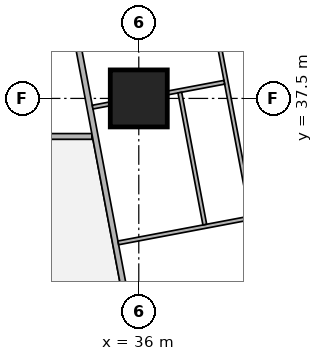
"""IFC4 building model, lengths in metres.
Left out: names, types, materials, properties, quantities, classifications, styles, units other than length and angle.
Written with IfcOpenShell. Run it as: python <this file> out.ifc"""

import sys

from ifc_helpers import new_model, si_unit, direction, frame, frame_2d, origin, origin_2d, place, context, subcontext, project, spatial, rectangle, extrude, element, fill, save


model = new_model("IFC4")
c1 = context("Model", 3, precision=1e-05, world=origin(), true_north=direction((0.0, 1.0)))
c2 = subcontext(c1, "Body", "Model", "MODEL_VIEW")
j1 = project(units=[si_unit("LENGTHUNIT", "METRE"), si_unit("PLANEANGLEUNIT", "RADIAN")], contexts=[c1])
p1 = place(None, origin())
s1 = spatial("IfcSite", under=j1, at=p1, CompositionType="ELEMENT")
p2 = place(p1, origin())
s2 = spatial("IfcBuilding", under=s1, at=p2, CompositionType="ELEMENT")
p3 = place(p2, frame((0.0, 0.0, 139.55)))
s3 = spatial("IfcBuildingStorey", under=s2, at=p3, CompositionType="ELEMENT", Elevation=139.55)
p4 = place(p3, frame((36.0, 37.5, 0.0), z_axis=(0.0, 0.0, 1.0), x_axis=(1.0, 0.0, 0.0)))
e1 = element("IfcColumn", 1, at=p4, inside=s3, PredefinedType="COLUMN", context=c2, shape_type="SweptSolid", body=[
    extrude(rectangle(XDim=1.5, YDim=1.5, at=origin_2d()), origin(), (0.0, 0.0, 1.0), 3.75),
])
p5 = place(p3, frame((8.35, 36.5, 0.0), z_axis=(0.0, 0.0, 1.0), x_axis=(1.0, 0.0, 0.0)))
e2 = element("IfcWall", 2, at=p5, inside=s3, PredefinedType="SOLIDWALL", context=c2, shape_type="SweptSolid", body=[
    extrude(rectangle(XDim=26.415, YDim=0.15, at=frame_2d((13.208, 0.0))), origin(), (0.0, 0.0, 1.0), 3.5),
])
p6 = place(p5, frame((2.6, 0.0, 0.0)))
e3 = element("IfcOpeningElement", 3, at=p6, cuts=e2, PredefinedType="OPENING", context=c2, shape_type="SweptSolid", body=[
    extrude(rectangle(XDim=1.0, YDim=2.1, at=frame_2d((0.5, 1.05))), frame((0.0, 0.085, 0.0), z_axis=(0.0, -1.0, 0.0), x_axis=(1.0, 0.0, 0.0)), (0.0, 0.0, 1.0), 0.17),
])
p7 = place(p5, frame((10.75, 0.0, 0.0)))
e4 = element("IfcOpeningElement", 4, at=p7, cuts=e2, PredefinedType="OPENING", context=c2, shape_type="SweptSolid", body=[
    extrude(rectangle(XDim=1.0, YDim=2.1, at=frame_2d((0.5, 1.05))), frame((0.0, 0.085, 0.0), z_axis=(0.0, -1.0, 0.0), x_axis=(1.0, 0.0, 0.0)), (0.0, 0.0, 1.0), 0.17),
])
p8 = place(p3, frame((33.623, 43.022, 0.0), z_axis=(0.0, 0.0, 1.0), x_axis=(0.185596841028, -0.98262597798, 0.0)))
e5 = element("IfcWall", 5, at=p8, inside=s3, PredefinedType="SOLIDWALL", context=c2, shape_type="SweptSolid", body=[
    extrude(rectangle(XDim=41.66, YDim=0.15, at=frame_2d((20.83, 0.0))), origin(), (0.0, 0.0, 1.0), 2.5),
])
p9 = place(p8, frame((20.242, 0.0, 0.0)))
e6 = element("IfcOpeningElement", 6, at=p9, cuts=e5, PredefinedType="OPENING", context=c2, shape_type="SweptSolid", body=[
    extrude(rectangle(XDim=1.0, YDim=2.1, at=frame_2d((0.5, 1.05))), frame((0.0, 0.085, 0.0), z_axis=(0.0, -1.0, 0.0), x_axis=(1.0, 0.0, 0.0)), (0.0, 0.0, 1.0), 0.17),
])
p10 = place(p8, frame((24.714, 0.0, 0.0)))
e7 = element("IfcOpeningElement", 7, at=p10, cuts=e5, PredefinedType="OPENING", context=c2, shape_type="SweptSolid", body=[
    extrude(rectangle(XDim=1.0, YDim=2.1, at=frame_2d((0.5, 1.05))), frame((0.0, 0.085, 0.0), z_axis=(0.0, -1.0, 0.0), x_axis=(1.0, 0.0, 0.0)), (0.0, 0.0, 1.0), 0.17),
])
p11 = place(p8, frame((31.206, 0.0, 0.0)))
e8 = element("IfcOpeningElement", 8, at=p11, cuts=e5, PredefinedType="OPENING", context=c2, shape_type="SweptSolid", body=[
    extrude(rectangle(XDim=1.0, YDim=2.1, at=frame_2d((0.5, 1.05))), frame((0.0, 0.085, 0.0), z_axis=(0.0, -1.0, 0.0), x_axis=(1.0, 0.0, 0.0)), (0.0, 0.0, 1.0), 0.17),
])
p12 = place(p3, frame((38.701, 42.27, 0.0), z_axis=(0.0, 0.0, 1.0), x_axis=(0.185640619081, -0.98261770824, 0.0)))
e9 = element("IfcWall", 9, at=p12, inside=s3, PredefinedType="PARTITIONING", context=c2, shape_type="SweptSolid", body=[
    extrude(rectangle(XDim=17.103, YDim=0.1, at=frame_2d((8.552, 0.0))), origin(), (0.0, 0.0, 1.0), 2.5),
])
p13 = place(p12, frame((16.053, 0.0, 0.0)))
e10 = element("IfcOpeningElement", 10, at=p13, cuts=e9, PredefinedType="OPENING", context=c2, shape_type="SweptSolid", body=[
    extrude(rectangle(XDim=0.9, YDim=2.1, at=frame_2d((0.45, 1.05))), frame((0.0, 0.06, 0.0), z_axis=(0.0, -1.0, 0.0), x_axis=(1.0, 0.0, 0.0)), (0.0, 0.0, 1.0), 0.12),
])
p14 = place(p12, frame((12.077, 0.0, 0.0)))
e11 = element("IfcOpeningElement", 11, at=p14, cuts=e9, PredefinedType="OPENING", context=c2, shape_type="SweptSolid", body=[
    extrude(rectangle(XDim=0.9, YDim=2.1, at=frame_2d((0.45, 1.05))), frame((0.0, 0.06, 0.0), z_axis=(0.0, -1.0, 0.0), x_axis=(1.0, 0.0, 0.0)), (0.0, 0.0, 1.0), 0.12),
])
p15 = place(p12, frame((8.42, 0.0, 0.0)))
e12 = element("IfcOpeningElement", 12, at=p15, cuts=e9, PredefinedType="OPENING", context=c2, shape_type="SweptSolid", body=[
    extrude(rectangle(XDim=0.9, YDim=2.1, at=frame_2d((0.45, 1.05))), frame((0.0, 0.06, 0.0), z_axis=(0.0, -1.0, 0.0), x_axis=(1.0, 0.0, 0.0)), (0.0, 0.0, 1.0), 0.12),
])
p16 = place(p12, frame((4.444, 0.0, 0.0)))
e13 = element("IfcOpeningElement", 13, at=p16, cuts=e9, PredefinedType="OPENING", context=c2, shape_type="SweptSolid", body=[
    extrude(rectangle(XDim=0.9, YDim=2.1, at=frame_2d((0.45, 1.05))), frame((0.0, 0.06, 0.0), z_axis=(0.0, -1.0, 0.0), x_axis=(1.0, 0.0, 0.0)), (0.0, 0.0, 1.0), 0.12),
])
p17 = place(p3, frame((37.411, 42.638, 0.0), z_axis=(0.0, 0.0, 1.0), x_axis=(0.185555586706, -0.982633769134, 0.0)))
e14 = element("IfcWall", 14, at=p17, inside=s3, PredefinedType="PARTITIONING", context=c2, shape_type="SweptSolid", body=[
    extrude(rectangle(XDim=17.704, YDim=0.1, at=frame_2d((8.852, 0.0))), origin(), (0.0, 0.0, 1.0), 2.5),
])
p18 = place(p17, frame((16.28, 0.0, 0.0)))
e15 = element("IfcOpeningElement", 15, at=p18, cuts=e14, PredefinedType="OPENING", context=c2, shape_type="SweptSolid", body=[
    extrude(rectangle(XDim=0.9, YDim=2.1, at=frame_2d((0.45, 1.05))), frame((0.0, 0.06, 0.0), z_axis=(0.0, -1.0, 0.0), x_axis=(1.0, 0.0, 0.0)), (0.0, 0.0, 1.0), 0.12),
])
p19 = place(p17, frame((12.688, 0.0, 0.0)))
e16 = element("IfcOpeningElement", 16, at=p19, cuts=e14, PredefinedType="OPENING", context=c2, shape_type="SweptSolid", body=[
    extrude(rectangle(XDim=0.9, YDim=2.1, at=frame_2d((0.45, 1.05))), frame((0.0, 0.06, 0.0), z_axis=(0.0, -1.0, 0.0), x_axis=(1.0, 0.0, 0.0)), (0.0, 0.0, 1.0), 0.12),
])
p20 = place(p17, frame((8.822, 0.0, 0.0)))
e17 = element("IfcOpeningElement", 17, at=p20, cuts=e14, PredefinedType="OPENING", context=c2, shape_type="SweptSolid", body=[
    extrude(rectangle(XDim=0.9, YDim=2.1, at=frame_2d((0.45, 1.05))), frame((0.0, 0.06, 0.0), z_axis=(0.0, -1.0, 0.0), x_axis=(1.0, 0.0, 0.0)), (0.0, 0.0, 1.0), 0.12),
])
p21 = place(p17, frame((3.188, 0.0, 0.0)))
e18 = element("IfcOpeningElement", 18, at=p21, cuts=e14, PredefinedType="OPENING", context=c2, shape_type="SweptSolid", body=[
    extrude(rectangle(XDim=0.9, YDim=2.1, at=frame_2d((0.45, 1.05))), frame((0.0, 0.06, 0.0), z_axis=(0.0, -1.0, 0.0), x_axis=(1.0, 0.0, 0.0)), (0.0, 0.0, 1.0), 0.12),
])
p22 = place(p17, frame((0.15, 0.0, 0.0)))
e19 = element("IfcOpeningElement", 19, at=p22, cuts=e14, PredefinedType="OPENING", context=c2, shape_type="SweptSolid", body=[
    extrude(rectangle(XDim=0.9, YDim=2.1, at=frame_2d((0.45, 1.05))), frame((0.0, 0.06, 0.0), z_axis=(0.0, -1.0, 0.0), x_axis=(1.0, 0.0, 0.0)), (0.0, 0.0, 1.0), 0.12),
])
p23 = place(p17, frame((14.371, 0.0, 0.0)))
e20 = element("IfcOpeningElement", 20, at=p23, cuts=e14, PredefinedType="OPENING", context=c2, shape_type="SweptSolid", body=[
    extrude(rectangle(XDim=0.9, YDim=2.1, at=frame_2d((0.45, 1.05))), frame((0.0, 0.06, 0.0), z_axis=(0.0, -1.0, 0.0), x_axis=(1.0, 0.0, 0.0)), (0.0, 0.0, 1.0), 0.12),
])
p24 = place(p17, frame((10.78, 0.0, 0.0)))
e21 = element("IfcOpeningElement", 21, at=p24, cuts=e14, PredefinedType="OPENING", context=c2, shape_type="SweptSolid", body=[
    extrude(rectangle(XDim=0.9, YDim=2.1, at=frame_2d((0.45, 1.05))), frame((0.0, 0.06, 0.0), z_axis=(0.0, -1.0, 0.0), x_axis=(1.0, 0.0, 0.0)), (0.0, 0.0, 1.0), 0.12),
])
p25 = place(p17, frame((6.154, 0.0, 0.0)))
e22 = element("IfcOpeningElement", 22, at=p25, cuts=e14, PredefinedType="OPENING", context=c2, shape_type="SweptSolid", body=[
    extrude(rectangle(XDim=0.9, YDim=2.1, at=frame_2d((0.45, 1.05))), frame((0.0, 0.06, 0.0), z_axis=(0.0, -1.0, 0.0), x_axis=(1.0, 0.0, 0.0)), (0.0, 0.0, 1.0), 0.12),
])
p26 = place(p3, frame((38.25, 37.925, 0.0), z_axis=(0.0, 0.0, 1.0), x_axis=(-0.982676595259, -0.18532865167, 0.0)))
e23 = element("IfcWall", 23, at=p26, inside=s3, PredefinedType="PARTITIONING", context=c2, shape_type="SweptSolid", body=[
    extrude(rectangle(XDim=1.516, YDim=0.1, at=frame_2d((0.758, 0.0))), origin(), (0.0, 0.0, 1.0), 3.5),
])
p27 = place(p3, frame((35.24, 37.357, 0.0), z_axis=(0.0, 0.0, 1.0), x_axis=(-0.982559813104, -0.18594680334, 0.0)))
e24 = element("IfcWall", 24, at=p27, inside=s3, PredefinedType="PARTITIONING", context=c2, shape_type="SweptSolid", body=[
    extrude(rectangle(XDim=0.462, YDim=0.1, at=frame_2d((0.231, 0.0))), origin(), (0.0, 0.0, 1.0), 3.5),
])
p28 = place(p3, frame((39.24, 32.683, 0.0), z_axis=(0.0, 0.0, 1.0), x_axis=(-0.982638553676, -0.185530247748, 0.0)))
e25 = element("IfcWall", 25, at=p28, inside=s3, PredefinedType="PARTITIONING", context=c2, shape_type="SweptSolid", body=[
    extrude(rectangle(XDim=3.525, YDim=0.1, at=frame_2d((1.763, 0.0))), origin(), (0.0, 0.0, 1.0), 3.5),
])
p29 = place(p3, frame((38.924, 34.353, 0.0), z_axis=(0.0, 0.0, 1.0), x_axis=(-0.982629014545, -0.18558076348, 0.0)))
e26 = element("IfcWall", 26, at=p29, inside=s3, PredefinedType="PARTITIONING", context=c2, shape_type="SweptSolid", body=[
    extrude(rectangle(XDim=3.524, YDim=0.1, at=frame_2d((1.762, 0.0))), origin(), (0.0, 0.0, 1.0), 3.5),
])
p30 = place(p3, frame((37.08, 37.653, 0.0), z_axis=(0.0, 0.0, 1.0), x_axis=(0.185864634688, -0.982575359742, 0.0)))
e27 = element("IfcWall", 27, at=p30, inside=s3, PredefinedType="PARTITIONING", context=c2, shape_type="SweptSolid", body=[
    extrude(rectangle(XDim=3.535, YDim=0.1, at=frame_2d((1.767, 0.0))), origin(), (0.0, 0.0, 1.0), 3.5),
])
p31 = place(p30, frame((1.317, 0.0, 0.0)))
e28 = element("IfcOpeningElement", 28, at=p31, cuts=e27, PredefinedType="OPENING", context=c2, shape_type="SweptSolid", body=[
    extrude(rectangle(XDim=0.9, YDim=2.1, at=frame_2d((0.45, 1.05))), frame((0.0, 0.06, 0.0), z_axis=(0.0, -1.0, 0.0), x_axis=(1.0, 0.0, 0.0)), (0.0, 0.0, 1.0), 0.12),
])
p32 = place(p21, origin())
e29 = element("IfcDoor", 29, at=p32, inside=s3, OperationType="SINGLE_SWING_RIGHT", PredefinedType="DOOR", context=c2, shape_type="SweptSolid", body=[
    extrude(rectangle(XDim=0.9, YDim=2.1, at=frame_2d((0.45, 1.05))), frame((0.0, 0.025, 0.0), z_axis=(0.0, -1.0, 0.0), x_axis=(1.0, 0.0, 0.0)), (0.0, 0.0, 1.0), 0.05),
])
fill(e18, e29)
p33 = place(p25, origin())
e30 = element("IfcDoor", 30, at=p33, inside=s3, OperationType="SINGLE_SWING_LEFT", PredefinedType="DOOR", context=c2, shape_type="SweptSolid", body=[
    extrude(rectangle(XDim=0.9, YDim=2.1, at=frame_2d((0.45, 1.05))), frame((0.0, 0.025, 0.0), z_axis=(0.0, -1.0, 0.0), x_axis=(1.0, 0.0, 0.0)), (0.0, 0.0, 1.0), 0.05),
])
fill(e22, e30)
p34 = place(p31, origin())
e31 = element("IfcDoor", 31, at=p34, inside=s3, OperationType="SINGLE_SWING_LEFT", PredefinedType="DOOR", context=c2, shape_type="SweptSolid", body=[
    extrude(rectangle(XDim=0.9, YDim=2.1, at=frame_2d((0.45, 1.05))), frame((0.0, 0.025, 0.0), z_axis=(0.0, -1.0, 0.0), x_axis=(1.0, 0.0, 0.0)), (0.0, 0.0, 1.0), 0.05),
])
fill(e28, e31)
save(model, sys.argv[1])
